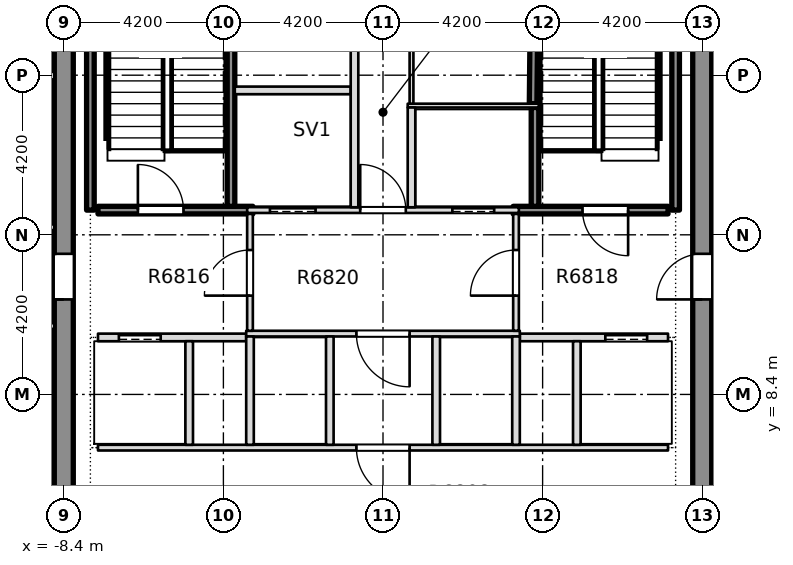
"""IFC4 building model, lengths in metres.
Left out: names, types, materials, properties, quantities, classifications, styles, units other than length and angle.
Written with IfcOpenShell. Run it as: python <this file> out.ifc"""

import sys

from ifc_helpers import new_model, si_unit, direction, frame, frame_2d, origin, place, context, subcontext, project, spatial, rectangle, extrude, element, fill, save


model = new_model("IFC4")
c1 = context("Model", 3, precision=1e-05, world=origin(), true_north=direction((0.0, 1.0)))
c2 = subcontext(c1, "Body", "Model", "MODEL_VIEW")
j1 = project(units=[si_unit("LENGTHUNIT", "METRE"), si_unit("PLANEANGLEUNIT", "RADIAN")], contexts=[c1])
p1 = place(None, origin())
s1 = spatial("IfcSite", under=j1, at=p1, CompositionType="ELEMENT")
p2 = place(p1, origin())
s2 = spatial("IfcBuilding", under=s1, at=p2, CompositionType="ELEMENT")
p3 = place(p2, frame((0.0, 0.0, 257.95)))
s3 = spatial("IfcBuildingStorey", under=s2, at=p3, CompositionType="ELEMENT", Elevation=257.95)
p4 = place(p3, frame((-8.4, -7.9, -0.4), z_axis=(0.0, 0.0, 1.0), x_axis=(0.0, 1.0, 0.0)))
e1 = element("IfcWall", 1, at=p4, inside=s3, PredefinedType="SHEAR", context=c2, shape_type="SweptSolid", body=[
    extrude(rectangle(XDim=29.15, YDim=0.5, at=frame_2d((14.575, 0.0))), origin(), (0.0, 0.0, 1.0), 3.45),
])
p5 = place(p4, frame((18.8, 0.0, 0.4)))
e2 = element("IfcOpeningElement", 2, at=p5, cuts=e1, PredefinedType="OPENING", context=c2, shape_type="SweptSolid", body=[
    extrude(rectangle(XDim=1.2, YDim=2.1, at=frame_2d((0.6, 1.05))), frame((0.0, 0.26, 0.0), z_axis=(0.0, -1.0, 0.0), x_axis=(1.0, 0.0, 0.0)), (0.0, 0.0, 1.0), 0.52),
])
p6 = place(p3, frame((8.4, -7.9, -0.4), z_axis=(0.0, 0.0, 1.0), x_axis=(0.0, 1.0, 0.0)))
e3 = element("IfcWall", 3, at=p6, inside=s3, PredefinedType="SHEAR", context=c2, shape_type="SweptSolid", body=[
    extrude(rectangle(XDim=29.15, YDim=0.5, at=frame_2d((14.575, 0.0))), origin(), (0.0, 0.0, 1.0), 3.45),
])
p7 = place(p6, frame((18.8, 0.0, 0.4)))
e4 = element("IfcOpeningElement", 4, at=p7, cuts=e3, PredefinedType="OPENING", context=c2, shape_type="SweptSolid", body=[
    extrude(rectangle(XDim=1.2, YDim=2.1, at=frame_2d((0.6, 1.05))), frame((0.0, 0.26, 0.0), z_axis=(0.0, -1.0, 0.0), x_axis=(1.0, 0.0, 0.0)), (0.0, 0.0, 1.0), 0.52),
])
p8 = place(p3, frame((-7.5, 7.0, 0.0), z_axis=(0.0, 0.0, 1.0), x_axis=(1.0, 0.0, 0.0)))
e5 = element("IfcWall", 5, at=p8, inside=s3, PredefinedType="PARTITIONING", context=c2, shape_type="SweptSolid", body=[
    extrude(rectangle(XDim=15.0, YDim=0.15, at=frame_2d((7.5, 0.0))), origin(), (0.0, 0.0, 1.0), 3.05),
])
p9 = place(p8, frame((6.8, 0.0, 0.0)))
e6 = element("IfcOpeningElement", 6, at=p9, cuts=e5, PredefinedType="OPENING", context=c2, shape_type="SweptSolid", body=[
    extrude(rectangle(XDim=1.4, YDim=2.1, at=frame_2d((0.7, 1.05))), frame((0.0, 0.085, 0.0), z_axis=(0.0, -1.0, 0.0), x_axis=(1.0, 0.0, 0.0)), (0.0, 0.0, 1.0), 0.17),
])
p10 = place(p3, frame((-7.5, 9.9, 0.0), z_axis=(0.0, 0.0, 1.0), x_axis=(1.0, 0.0, 0.0)))
e7 = element("IfcWall", 7, at=p10, inside=s3, PredefinedType="PARTITIONING", context=c2, shape_type="SweptSolid", body=[
    extrude(rectangle(XDim=3.9, YDim=0.2, at=frame_2d((1.95, 0.0))), origin(), (0.0, 0.0, 1.0), 3.05),
])
p11 = place(p10, frame((0.55, 0.0, 0.0)))
e8 = element("IfcOpeningElement", 8, at=p11, cuts=e7, PredefinedType="OPENING", context=c2, shape_type="SweptSolid", body=[
    extrude(rectangle(XDim=1.1, YDim=2.1, at=frame_2d((0.55, 1.05))), frame((0.0, 0.11, 0.0), z_axis=(0.0, -1.0, 0.0), x_axis=(1.0, 0.0, 0.0)), (0.0, 0.0, 1.0), 0.22),
])
p12 = place(p3, frame((3.6, 9.9, 0.0), z_axis=(0.0, 0.0, 1.0), x_axis=(1.0, 0.0, 0.0)))
e9 = element("IfcWall", 9, at=p12, inside=s3, PredefinedType="PARTITIONING", context=c2, shape_type="SweptSolid", body=[
    extrude(rectangle(XDim=3.9, YDim=0.2, at=frame_2d((1.95, 0.0))), origin(), (0.0, 0.0, 1.0), 3.05),
])
p13 = place(p12, frame((2.25, 0.0, 0.0)))
e10 = element("IfcOpeningElement", 10, at=p13, cuts=e9, PredefinedType="OPENING", context=c2, shape_type="SweptSolid", body=[
    extrude(rectangle(XDim=1.1, YDim=2.1, at=frame_2d((0.55, 1.05))), frame((0.0, 0.11, 0.0), z_axis=(0.0, -1.0, 0.0), x_axis=(1.0, 0.0, 0.0)), (0.0, 0.0, 1.0), 0.22),
])
p14 = place(p3, frame((-3.6, 10.0, 0.0), z_axis=(0.0, 0.0, 1.0), x_axis=(1.0, 0.0, 0.0)))
e11 = element("IfcWall", 11, at=p14, inside=s3, PredefinedType="PARTITIONING", context=c2, shape_type="SweptSolid", body=[
    extrude(rectangle(XDim=7.2, YDim=0.15, at=frame_2d((3.6, 0.0))), origin(), (0.0, 0.0, 1.0), 3.05),
])
p15 = place(p14, frame((2.9, 0.0, 0.0)))
e12 = element("IfcOpeningElement", 12, at=p15, cuts=e11, PredefinedType="OPENING", context=c2, shape_type="SweptSolid", body=[
    extrude(rectangle(XDim=1.4, YDim=2.1, at=frame_2d((0.7, 1.05))), frame((0.0, 0.085, 0.0), z_axis=(0.0, -1.0, 0.0), x_axis=(1.0, 0.0, 0.0)), (0.0, 0.0, 1.0), 0.17),
])
p16 = place(p3, frame((-7.5, 13.25, 0.0), z_axis=(0.0, 0.0, 1.0), x_axis=(1.0, 0.0, 0.0)))
e13 = element("IfcWall", 13, at=p16, inside=s3, PredefinedType="SOLIDWALL", context=c2, shape_type="SweptSolid", body=[
    extrude(rectangle(XDim=4.075, YDim=0.2, at=frame_2d((2.038, 0.0))), origin(), (0.0, 0.0, 1.0), 3.05),
])
p17 = place(p16, frame((1.05, 0.0, 0.0)))
e14 = element("IfcOpeningElement", 14, at=p17, cuts=e13, PredefinedType="OPENING", context=c2, shape_type="SweptSolid", body=[
    extrude(rectangle(XDim=1.2, YDim=2.1, at=frame_2d((0.6, 1.05))), frame((0.0, 0.11, 0.0), z_axis=(0.0, -1.0, 0.0), x_axis=(1.0, 0.0, 0.0)), (0.0, 0.0, 1.0), 0.22),
])
p18 = place(p3, frame((-3.575, 13.25, 0.0), z_axis=(0.0, 0.0, 1.0), x_axis=(1.0, 0.0, 0.0)))
e15 = element("IfcWall", 15, at=p18, inside=s3, PredefinedType="PARTITIONING", context=c2, shape_type="SweptSolid", body=[
    extrude(rectangle(XDim=7.15, YDim=0.15, at=frame_2d((3.575, 0.0))), origin(), (0.0, 0.0, 1.0), 3.05),
])
p19 = place(p18, frame((0.6, 0.0, 0.0)))
e16 = element("IfcOpeningElement", 16, at=p19, cuts=e15, PredefinedType="OPENING", context=c2, shape_type="SweptSolid", body=[
    extrude(rectangle(XDim=1.2, YDim=2.1, at=frame_2d((0.6, 1.05))), frame((0.0, 0.085, 0.0), z_axis=(0.0, -1.0, 0.0), x_axis=(1.0, 0.0, 0.0)), (0.0, 0.0, 1.0), 0.17),
])
p20 = place(p18, frame((5.4, 0.0, 0.0)))
e17 = element("IfcOpeningElement", 17, at=p20, cuts=e15, PredefinedType="OPENING", context=c2, shape_type="SweptSolid", body=[
    extrude(rectangle(XDim=1.1, YDim=2.1, at=frame_2d((0.55, 1.05))), frame((0.0, 0.085, 0.0), z_axis=(0.0, -1.0, 0.0), x_axis=(1.0, 0.0, 0.0)), (0.0, 0.0, 1.0), 0.17),
])
p21 = place(p18, frame((2.975, 0.0, 0.0)))
e18 = element("IfcOpeningElement", 18, at=p21, cuts=e15, PredefinedType="OPENING", context=c2, shape_type="SweptSolid", body=[
    extrude(rectangle(XDim=1.2, YDim=2.1, at=frame_2d((0.6, 1.05))), frame((0.0, 0.085, 0.0), z_axis=(0.0, -1.0, 0.0), x_axis=(1.0, 0.0, 0.0)), (0.0, 0.0, 1.0), 0.17),
])
p22 = place(p3, frame((3.425, 13.25, 0.0), z_axis=(0.0, 0.0, 1.0), x_axis=(1.0, 0.0, 0.0)))
e19 = element("IfcWall", 19, at=p22, inside=s3, PredefinedType="SOLIDWALL", context=c2, shape_type="SweptSolid", body=[
    extrude(rectangle(XDim=4.075, YDim=0.2, at=frame_2d((2.038, 0.0))), origin(), (0.0, 0.0, 1.0), 3.05),
])
p23 = place(p22, frame((1.825, 0.0, 0.0)))
e20 = element("IfcOpeningElement", 20, at=p23, cuts=e19, PredefinedType="OPENING", context=c2, shape_type="SweptSolid", body=[
    extrude(rectangle(XDim=1.2, YDim=2.1, at=frame_2d((0.6, 1.05))), frame((0.0, 0.11, 0.0), z_axis=(0.0, -1.0, 0.0), x_axis=(1.0, 0.0, 0.0)), (0.0, 0.0, 1.0), 0.22),
])
p24 = place(p3, frame((0.65, 16.0, 0.0), z_axis=(0.0, 0.0, 1.0), x_axis=(1.0, 0.0, 0.0)))
e21 = element("IfcWall", 21, at=p24, inside=s3, PredefinedType="PARTITIONING", context=c2, shape_type="SweptSolid", body=[
    extrude(rectangle(XDim=3.45, YDim=0.1, at=frame_2d((1.725, 0.0))), origin(), (0.0, 0.0, 1.0), 3.05),
])
p25 = place(p3, frame((-3.9, 16.4, 0.0), z_axis=(0.0, 0.0, 1.0), x_axis=(1.0, 0.0, 0.0)))
e22 = element("IfcWall", 22, at=p25, inside=s3, PredefinedType="PARTITIONING", context=c2, shape_type="SweptSolid", body=[
    extrude(rectangle(XDim=3.05, YDim=0.2, at=frame_2d((1.525, 0.0))), origin(), (0.0, 0.0, 1.0), 3.05),
])
p26 = place(p3, frame((-5.1, 7.075, 0.0), z_axis=(0.0, 0.0, 1.0), x_axis=(0.0, 1.0, 0.0)))
e23 = element("IfcWall", 23, at=p26, inside=s3, PredefinedType="PARTITIONING", context=c2, shape_type="SweptSolid", body=[
    extrude(rectangle(XDim=2.725, YDim=0.2, at=frame_2d((1.363, 0.0))), origin(), (0.0, 0.0, 1.0), 3.05),
])
p27 = place(p3, frame((-4.0, 13.35, 0.0), z_axis=(0.0, 0.0, 1.0), x_axis=(0.0, 1.0, 0.0)))
e24 = element("IfcWall", 24, at=p27, inside=s3, PredefinedType="SOLIDWALL", context=c2, shape_type="SweptSolid", body=[
    extrude(rectangle(XDim=7.899, YDim=0.2, at=frame_2d((3.949, 0.0))), origin(), (0.0, 0.0, 1.0), 3.05),
])
p28 = place(p3, frame((-3.5, 7.075, 0.0), z_axis=(0.0, 0.0, 1.0), x_axis=(0.0, 1.0, 0.0)))
e25 = element("IfcWall", 25, at=p28, inside=s3, PredefinedType="PARTITIONING", context=c2, shape_type="SweptSolid", body=[
    extrude(rectangle(XDim=2.85, YDim=0.2, at=frame_2d((1.425, 0.0))), origin(), (0.0, 0.0, 1.0), 3.05),
])
p29 = place(p3, frame((-3.5, 10.075, 0.0), z_axis=(0.0, 0.0, 1.0), x_axis=(0.0, 1.0, 0.0)))
e26 = element("IfcWall", 26, at=p29, inside=s3, PredefinedType="PARTITIONING", context=c2, shape_type="SweptSolid", body=[
    extrude(rectangle(XDim=3.075, YDim=0.15, at=frame_2d((1.538, 0.0))), origin(), (0.0, 0.0, 1.0), 3.05),
])
p30 = place(p29, frame((0.925, 0.0, 0.0)))
e27 = element("IfcOpeningElement", 27, at=p30, cuts=e26, PredefinedType="OPENING", context=c2, shape_type="SweptSolid", body=[
    extrude(rectangle(XDim=1.2, YDim=2.1, at=frame_2d((0.6, 1.05))), frame((0.0, 0.085, 0.0), z_axis=(0.0, -1.0, 0.0), x_axis=(1.0, 0.0, 0.0)), (0.0, 0.0, 1.0), 0.17),
])
p31 = place(p3, frame((-1.4, 7.075, 0.0), z_axis=(0.0, 0.0, 1.0), x_axis=(0.0, 1.0, 0.0)))
e28 = element("IfcWall", 28, at=p31, inside=s3, PredefinedType="PARTITIONING", context=c2, shape_type="SweptSolid", body=[
    extrude(rectangle(XDim=2.85, YDim=0.2, at=frame_2d((1.425, 0.0))), origin(), (0.0, 0.0, 1.0), 3.05),
])
p32 = place(p3, frame((-0.75, 13.325, 0.0), z_axis=(0.0, 0.0, 1.0), x_axis=(0.0, 1.0, 0.0)))
e29 = element("IfcWall", 29, at=p32, inside=s3, PredefinedType="PARTITIONING", context=c2, shape_type="SweptSolid", body=[
    extrude(rectangle(XDim=7.924, YDim=0.2, at=frame_2d((3.962, 0.0))), origin(), (0.0, 0.0, 1.0), 3.05),
])
p33 = place(p32, frame((4.8, 0.0, 0.0)))
e30 = element("IfcOpeningElement", 30, at=p33, cuts=e29, PredefinedType="OPENING", context=c2, shape_type="SweptSolid", body=[
    extrude(rectangle(XDim=0.95, YDim=2.1, at=frame_2d((0.475, 1.05))), frame((0.0, 0.11, 0.0), z_axis=(0.0, -1.0, 0.0), x_axis=(1.0, 0.0, 0.0)), (0.0, 0.0, 1.0), 0.22),
])
p34 = place(p3, frame((0.75, 13.325, 0.0), z_axis=(0.0, 0.0, 1.0), x_axis=(0.0, 1.0, 0.0)))
e31 = element("IfcWall", 31, at=p34, inside=s3, PredefinedType="PARTITIONING", context=c2, shape_type="SweptSolid", body=[
    extrude(rectangle(XDim=2.625, YDim=0.2, at=frame_2d((1.312, 0.0))), origin(), (0.0, 0.0, 1.0), 3.05),
])
p35 = place(p3, frame((0.75, 16.05, 0.0), z_axis=(0.0, 0.0, 1.0), x_axis=(0.0, 1.0, 0.0)))
e32 = element("IfcWall", 32, at=p35, inside=s3, PredefinedType="PARTITIONING", context=c2, shape_type="SweptSolid", body=[
    extrude(rectangle(XDim=5.199, YDim=0.1, at=frame_2d((2.6, 0.0))), origin(), (0.0, 0.0, 1.0), 3.05),
])
p36 = place(p35, frame((1.875, 0.0, 0.0)))
e33 = element("IfcOpeningElement", 33, at=p36, cuts=e32, PredefinedType="OPENING", context=c2, shape_type="SweptSolid", body=[
    extrude(rectangle(XDim=0.95, YDim=2.1, at=frame_2d((0.475, 1.05))), frame((0.0, 0.06, 0.0), z_axis=(0.0, -1.0, 0.0), x_axis=(1.0, 0.0, 0.0)), (0.0, 0.0, 1.0), 0.12),
])
for number, where, z_axis, x_axis in (
    (34, (1.4, 7.075, 0.0), (0.0, 0.0, 1.0), (0.0, 1.0, 0.0)),
    (35, (3.5, 7.075, 0.0), (0.0, 0.0, 1.0), (0.0, 1.0, 0.0)),
):
    element("IfcWall", number, at=place(p3, frame(where, z_axis=z_axis, x_axis=x_axis)), inside=s3, PredefinedType="PARTITIONING", context=c2, shape_type="SweptSolid", body=[
        extrude(rectangle(XDim=2.85, YDim=0.2, at=frame_2d((1.425, 0.0))), origin(), (0.0, 0.0, 1.0), 3.05),
    ])
p37 = place(p3, frame((3.5, 10.075, 0.0), z_axis=(0.0, 0.0, 1.0), x_axis=(0.0, 1.0, 0.0)))
e36 = element("IfcWall", 36, at=p37, inside=s3, PredefinedType="PARTITIONING", context=c2, shape_type="SweptSolid", body=[
    extrude(rectangle(XDim=3.075, YDim=0.15, at=frame_2d((1.538, 0.0))), origin(), (0.0, 0.0, 1.0), 3.05),
])
p38 = place(p37, frame((0.925, 0.0, 0.0)))
e37 = element("IfcOpeningElement", 37, at=p38, cuts=e36, PredefinedType="OPENING", context=c2, shape_type="SweptSolid", body=[
    extrude(rectangle(XDim=1.2, YDim=2.1, at=frame_2d((0.6, 1.05))), frame((0.0, 0.085, 0.0), z_axis=(0.0, -1.0, 0.0), x_axis=(1.0, 0.0, 0.0)), (0.0, 0.0, 1.0), 0.17),
])
p39 = place(p3, frame((4.0, 13.35, 0.0), z_axis=(0.0, 0.0, 1.0), x_axis=(0.0, 1.0, 0.0)))
e38 = element("IfcWall", 38, at=p39, inside=s3, PredefinedType="SOLIDWALL", context=c2, shape_type="SweptSolid", body=[
    extrude(rectangle(XDim=2.6, YDim=0.2, at=frame_2d((1.3, 0.0))), origin(), (0.0, 0.0, 1.0), 3.05),
])
p40 = place(p3, frame((3.95, 16.05, 0.0), z_axis=(0.0, 0.0, 1.0), x_axis=(0.009719787395, 0.999952761751, 0.0)))
e39 = element("IfcWall", 39, at=p40, inside=s3, PredefinedType="SOLIDWALL", context=c2, shape_type="SweptSolid", body=[
    extrude(rectangle(XDim=5.149, YDim=0.2, at=frame_2d((2.575, 0.0))), origin(), (0.0, 0.0, 1.0), 3.05),
])
p41 = place(p3, frame((5.1, 7.075, 0.0), z_axis=(0.0, 0.0, 1.0), x_axis=(0.0, 1.0, 0.0)))
e40 = element("IfcWall", 40, at=p41, inside=s3, PredefinedType="PARTITIONING", context=c2, shape_type="SweptSolid", body=[
    extrude(rectangle(XDim=2.725, YDim=0.2, at=frame_2d((1.363, 0.0))), origin(), (0.0, 0.0, 1.0), 3.05),
])
for number, where, z_axis, x_axis in (
    (41, (-12.099, 10.2, 0.0), (0.0, 0.0, 1.0), (1.0, 0.0, 0.0)),
    (42, (-12.099, 12.8, 0.0), (0.0, 0.0, 1.0), (1.0, 0.0, 0.0)),
):
    element("IfcWall", number, at=place(p3, frame(where, z_axis=z_axis, x_axis=x_axis)), inside=s3, PredefinedType="PARTITIONING", context=c2, shape_type="SweptSolid", body=[
        extrude(rectangle(XDim=3.448, YDim=0.15, at=frame_2d((1.724, 0.0))), origin(), (0.0, 0.0, 1.0), 3.05),
    ])
p42 = place(p3, frame((-12.099, 16.788, 0.0), z_axis=(0.0, 0.0, 1.0), x_axis=(1.0, 0.0, 0.0)))
e43 = element("IfcWall", 43, at=p42, inside=s3, PredefinedType="PARTITIONING", context=c2, shape_type="SweptSolid", body=[
    extrude(rectangle(XDim=3.448, YDim=0.2, at=frame_2d((1.724, 0.0))), origin(), (0.0, 0.0, 1.0), 3.05),
])
for number, where, z_axis, x_axis in (
    (44, (8.651, 10.2, 0.0), (0.0, 0.0, 1.0), (1.0, 0.0, 0.0)),
    (45, (8.651, 12.8, 0.0), (0.0, 0.0, 1.0), (1.0, 0.0, 0.0)),
):
    element("IfcWall", number, at=place(p3, frame(where, z_axis=z_axis, x_axis=x_axis)), inside=s3, PredefinedType="PARTITIONING", context=c2, shape_type="SweptSolid", body=[
        extrude(rectangle(XDim=3.448, YDim=0.15, at=frame_2d((1.724, 0.0))), origin(), (0.0, 0.0, 1.0), 3.05),
    ])
p43 = place(p3, frame((8.651, 15.637, 0.0), z_axis=(0.0, 0.0, 1.0), x_axis=(1.0, 0.0, 0.0)))
e46 = element("IfcWall", 46, at=p43, inside=s3, PredefinedType="PARTITIONING", context=c2, shape_type="SweptSolid", body=[
    extrude(rectangle(XDim=3.448, YDim=0.2, at=frame_2d((1.724, 0.0))), origin(), (0.0, 0.0, 1.0), 3.05),
])
for number, where, z_axis, x_axis in (
    (47, (-7.7, 13.25, 0.0), (0.0, 0.0, 1.0), (0.0, 1.0, 0.0)),
    (48, (7.7, 13.25, 0.0), (0.0, 0.0, 1.0), (0.0, 1.0, 0.0)),
):
    element("IfcWall", number, at=place(p3, frame(where, z_axis=z_axis, x_axis=x_axis)), inside=s3, PredefinedType="SOLIDWALL", context=c2, shape_type="SweptSolid", body=[
        extrude(rectangle(XDim=7.6, YDim=0.2, at=frame_2d((3.8, 0.0))), origin(), (0.0, 0.0, 1.0), 3.05),
    ])
p44 = place(p17, origin())
e49 = element("IfcDoor", 49, at=p44, inside=s3, OperationType="SINGLE_SWING_LEFT", PredefinedType="DOOR", context=c2, shape_type="SweptSolid", body=[
    extrude(rectangle(XDim=1.2, YDim=2.1, at=frame_2d((0.6, 1.05))), frame((0.0, 0.025, 0.0), z_axis=(0.0, -1.0, 0.0), x_axis=(1.0, 0.0, 0.0)), (0.0, 0.0, 1.0), 0.05),
])
fill(e14, e49)
p45 = place(p11, origin())
e50 = element("IfcDoor", 50, at=p45, inside=s3, OperationType="SLIDING_TO_RIGHT", PredefinedType="DOOR", context=c2, shape_type="SweptSolid", body=[
    extrude(rectangle(XDim=1.1, YDim=2.1, at=frame_2d((0.55, 1.05))), frame((0.0, 0.025, 0.0), z_axis=(0.0, -1.0, 0.0), x_axis=(1.0, 0.0, 0.0)), (0.0, 0.0, 1.0), 0.05),
])
fill(e8, e50)
p46 = place(p23, origin())
e51 = element("IfcDoor", 51, at=p46, inside=s3, OperationType="SINGLE_SWING_RIGHT", PredefinedType="DOOR", context=c2, shape_type="SweptSolid", body=[
    extrude(rectangle(XDim=1.2, YDim=2.1, at=frame_2d((0.6, 1.05))), frame((0.0, 0.025, 0.0), z_axis=(0.0, -1.0, 0.0), x_axis=(1.0, 0.0, 0.0)), (0.0, 0.0, 1.0), 0.05),
])
fill(e20, e51)
p47 = place(p13, origin())
e52 = element("IfcDoor", 52, at=p47, inside=s3, OperationType="SLIDING_TO_LEFT", PredefinedType="DOOR", context=c2, shape_type="SweptSolid", body=[
    extrude(rectangle(XDim=1.1, YDim=2.1, at=frame_2d((0.55, 1.05))), frame((0.0, 0.025, 0.0), z_axis=(0.0, -1.0, 0.0), x_axis=(1.0, 0.0, 0.0)), (0.0, 0.0, 1.0), 0.05),
])
fill(e10, e52)
p48 = place(p9, origin())
e53 = element("IfcDoor", 53, at=p48, inside=s3, OperationType="SINGLE_SWING_RIGHT", PredefinedType="DOOR", context=c2, shape_type="SweptSolid", body=[
    extrude(rectangle(XDim=1.4, YDim=2.1, at=frame_2d((0.7, 1.05))), frame((0.0, 0.025, 0.0), z_axis=(0.0, -1.0, 0.0), x_axis=(1.0, 0.0, 0.0)), (0.0, 0.0, 1.0), 0.05),
])
fill(e6, e53)
p49 = place(p15, origin())
e54 = element("IfcDoor", 54, at=p49, inside=s3, OperationType="SINGLE_SWING_RIGHT", PredefinedType="DOOR", context=c2, shape_type="SweptSolid", body=[
    extrude(rectangle(XDim=1.4, YDim=2.1, at=frame_2d((0.7, 1.05))), frame((0.0, 0.025, 0.0), z_axis=(0.0, -1.0, 0.0), x_axis=(1.0, 0.0, 0.0)), (0.0, 0.0, 1.0), 0.05),
])
fill(e12, e54)
p50 = place(p19, origin())
e55 = element("IfcDoor", 55, at=p50, inside=s3, OperationType="SLIDING_TO_RIGHT", PredefinedType="DOOR", context=c2, shape_type="SweptSolid", body=[
    extrude(rectangle(XDim=1.2, YDim=2.1, at=frame_2d((0.6, 1.05))), frame((0.0, 0.025, 0.0), z_axis=(0.0, -1.0, 0.0), x_axis=(1.0, 0.0, 0.0)), (0.0, 0.0, 1.0), 0.05),
])
fill(e16, e55)
p51 = place(p20, origin())
e56 = element("IfcDoor", 56, at=p51, inside=s3, OperationType="SLIDING_TO_LEFT", PredefinedType="DOOR", context=c2, shape_type="SweptSolid", body=[
    extrude(rectangle(XDim=1.1, YDim=2.1, at=frame_2d((0.55, 1.05))), frame((0.0, 0.025, 0.0), z_axis=(0.0, -1.0, 0.0), x_axis=(1.0, 0.0, 0.0)), (0.0, 0.0, 1.0), 0.05),
])
fill(e17, e56)
p52 = place(p21, origin())
e57 = element("IfcDoor", 57, at=p52, inside=s3, OperationType="SINGLE_SWING_RIGHT", PredefinedType="DOOR", context=c2, shape_type="SweptSolid", body=[
    extrude(rectangle(XDim=1.2, YDim=2.1, at=frame_2d((0.6, 1.05))), frame((0.0, 0.025, 0.0), z_axis=(0.0, -1.0, 0.0), x_axis=(1.0, 0.0, 0.0)), (0.0, 0.0, 1.0), 0.05),
])
fill(e18, e57)
p53 = place(p30, origin())
e58 = element("IfcDoor", 58, at=p53, inside=s3, OperationType="SINGLE_SWING_RIGHT", PredefinedType="DOOR", context=c2, shape_type="SweptSolid", body=[
    extrude(rectangle(XDim=1.2, YDim=2.1, at=frame_2d((0.6, 1.05))), frame((0.0, 0.025, 0.0), z_axis=(0.0, -1.0, 0.0), x_axis=(1.0, 0.0, 0.0)), (0.0, 0.0, 1.0), 0.05),
])
fill(e27, e58)
p54 = place(p38, origin())
e59 = element("IfcDoor", 59, at=p54, inside=s3, OperationType="SINGLE_SWING_LEFT", PredefinedType="DOOR", context=c2, shape_type="SweptSolid", body=[
    extrude(rectangle(XDim=1.2, YDim=2.1, at=frame_2d((0.6, 1.05))), frame((0.0, 0.025, 0.0), z_axis=(0.0, -1.0, 0.0), x_axis=(1.0, 0.0, 0.0)), (0.0, 0.0, 1.0), 0.05),
])
fill(e37, e59)
p55 = place(p5, origin())
e60 = element("IfcDoor", 60, at=p55, inside=s3, OperationType="SINGLE_SWING_LEFT", PredefinedType="DOOR", context=c2, shape_type="SweptSolid", body=[
    extrude(rectangle(XDim=1.2, YDim=2.1, at=frame_2d((0.6, 1.05))), frame((0.0, 0.025, 0.0), z_axis=(0.0, -1.0, 0.0), x_axis=(1.0, 0.0, 0.0)), (0.0, 0.0, 1.0), 0.05),
])
fill(e2, e60)
p56 = place(p7, origin())
e61 = element("IfcDoor", 61, at=p56, inside=s3, OperationType="SINGLE_SWING_LEFT", PredefinedType="DOOR", context=c2, shape_type="SweptSolid", body=[
    extrude(rectangle(XDim=1.2, YDim=2.1, at=frame_2d((0.6, 1.05))), frame((0.0, 0.025, 0.0), z_axis=(0.0, -1.0, 0.0), x_axis=(1.0, 0.0, 0.0)), (0.0, 0.0, 1.0), 0.05),
])
fill(e4, e61)
save(model, sys.argv[1])
